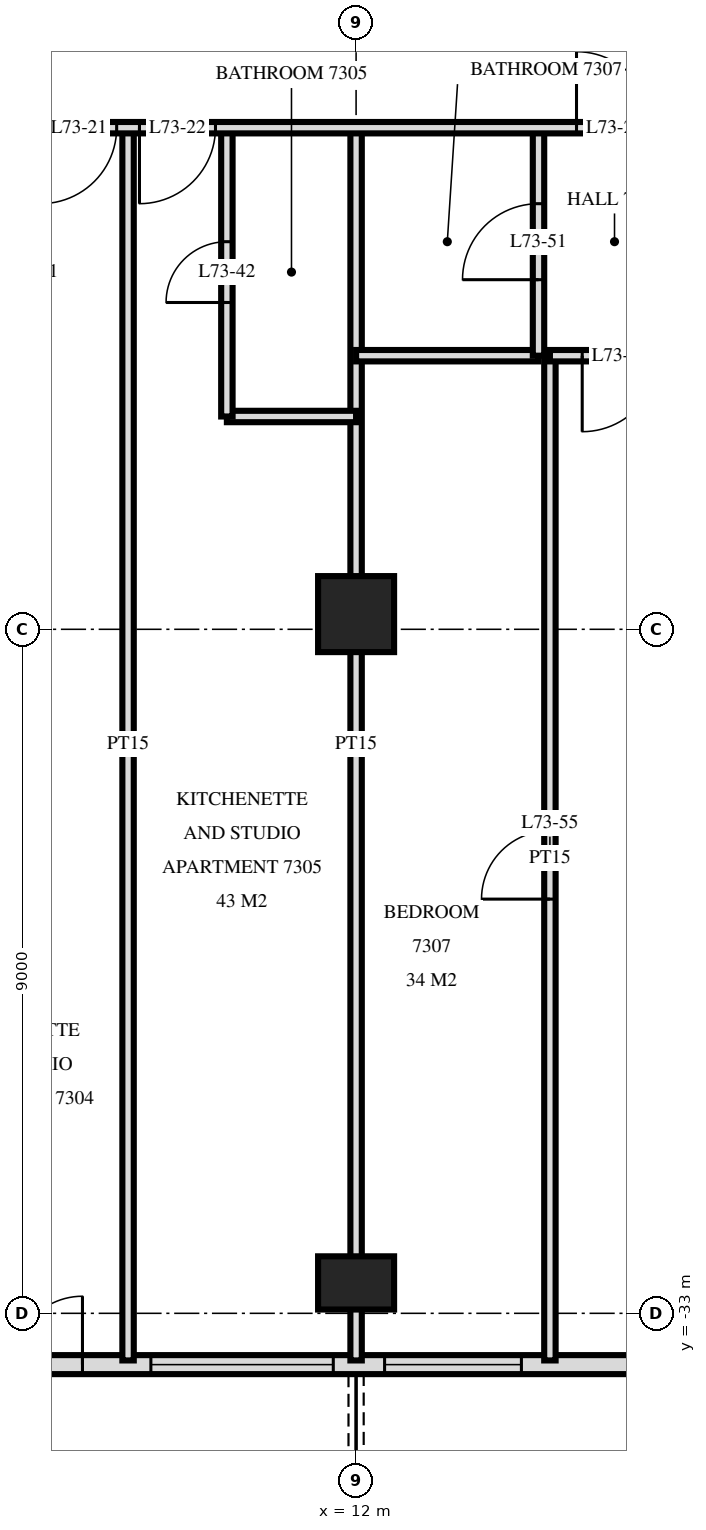
"""IFC4 building model, lengths in metres.
Left out: names, types, materials, properties, quantities, classifications, styles, units other than length and angle.
Written with IfcOpenShell. Run it as: python <this file> out.ifc"""

import sys

from ifc_helpers import new_model, si_unit, direction, frame, frame_2d, origin, origin_2d, place, context, subcontext, project, spatial, rectangle, extrude, element, fill, save


model = new_model("IFC4")
c1 = context("Model", 3, precision=1e-05, world=origin(), true_north=direction((0.0, 1.0)))
c2 = subcontext(c1, "Body", "Model", "MODEL_VIEW")
j1 = project(units=[si_unit("LENGTHUNIT", "METRE"), si_unit("PLANEANGLEUNIT", "RADIAN")], contexts=[c1])
p1 = place(None, origin())
s1 = spatial("IfcSite", under=j1, at=p1, CompositionType="ELEMENT")
p2 = place(p1, origin())
s2 = spatial("IfcBuilding", under=s1, at=p2, CompositionType="ELEMENT")
p3 = place(p2, frame((0.0, 0.0, 277.1)))
s3 = spatial("IfcBuildingStorey", under=s2, at=p3, CompositionType="ELEMENT", Elevation=277.1)
p4 = place(p3, frame((12.0, -32.6, 0.0), z_axis=(0.0, 0.0, 1.0), x_axis=(1.0, 0.0, 0.0)))
e1 = element("IfcColumn", 1, at=p4, inside=s3, PredefinedType="COLUMN", context=c2, shape_type="SweptSolid", body=[
    extrude(rectangle(XDim=1.0, YDim=0.7, at=origin_2d()), origin(), (0.0, 0.0, 1.0), 3.5),
])
p5 = place(p3, frame((12.0, -23.8, 0.0), z_axis=(0.0, 0.0, 1.0), x_axis=(1.0, 0.0, 0.0)))
e2 = element("IfcColumn", 2, at=p5, inside=s3, PredefinedType="COLUMN", context=c2, shape_type="SweptSolid", body=[
    extrude(rectangle(XDim=1.0, YDim=1.0, at=origin_2d()), origin(), (0.0, 0.0, 1.0), 3.5),
])
p6 = place(p3, frame((-18.575, -33.675, 0.0), z_axis=(0.0, 0.0, 1.0), x_axis=(1.0, 0.0, 0.0)))
e3 = element("IfcWall", 3, at=p6, inside=s3, PredefinedType="SOLIDWALL", context=c2, shape_type="SweptSolid", body=[
    extrude(rectangle(XDim=37.151, YDim=0.25, at=frame_2d((18.575, 0.0))), origin(), (0.0, 0.0, 1.0), 3.22),
])
p7 = place(p6, frame((4.175, 0.0, 0.0)))
e4 = element("IfcOpeningElement", 4, at=p7, cuts=e3, PredefinedType="OPENING", context=c2, shape_type="SweptSolid", body=[
    extrude(rectangle(XDim=1.8, YDim=2.4, at=frame_2d((0.9, 1.2))), frame((0.0, 0.135, 0.0), z_axis=(0.0, -1.0, 0.0), x_axis=(1.0, 0.0, 0.0)), (0.0, 0.0, 1.0), 0.27),
])
p8 = place(p6, frame((7.512, 0.0, 0.0)))
e5 = element("IfcOpeningElement", 5, at=p8, cuts=e3, PredefinedType="OPENING", context=c2, shape_type="SweptSolid", body=[
    extrude(rectangle(XDim=1.8, YDim=2.4, at=frame_2d((0.9, 1.2))), frame((0.0, 0.135, 0.0), z_axis=(0.0, -1.0, 0.0), x_axis=(1.0, 0.0, 0.0)), (0.0, 0.0, 1.0), 0.27),
])
p9 = place(p6, frame((10.287, 0.0, 0.9)))
e6 = element("IfcOpeningElement", 6, at=p9, cuts=e3, PredefinedType="OPENING", context=c2, shape_type="SweptSolid", body=[
    extrude(rectangle(XDim=1.8, YDim=1.5, at=frame_2d((0.9, 0.75))), frame((0.0, 0.135, 0.0), z_axis=(0.0, -1.0, 0.0), x_axis=(1.0, 0.0, 0.0)), (0.0, 0.0, 1.0), 0.27),
])
p10 = place(p6, frame((12.875, 0.0, 0.9)))
e7 = element("IfcOpeningElement", 7, at=p10, cuts=e3, PredefinedType="OPENING", context=c2, shape_type="SweptSolid", body=[
    extrude(rectangle(XDim=2.4, YDim=1.5, at=frame_2d((1.2, 0.75))), frame((0.0, 0.135, 0.0), z_axis=(0.0, -1.0, 0.0), x_axis=(1.0, 0.0, 0.0)), (0.0, 0.0, 1.0), 0.27),
])
p11 = place(p6, frame((16.175, 0.0, 0.0)))
e8 = element("IfcOpeningElement", 8, at=p11, cuts=e3, PredefinedType="OPENING", context=c2, shape_type="SweptSolid", body=[
    extrude(rectangle(XDim=1.8, YDim=2.4, at=frame_2d((0.9, 1.2))), frame((0.0, 0.135, 0.0), z_axis=(0.0, -1.0, 0.0), x_axis=(1.0, 0.0, 0.0)), (0.0, 0.0, 1.0), 0.27),
])
p12 = place(p6, frame((19.175, 0.0, 0.0)))
e9 = element("IfcOpeningElement", 9, at=p12, cuts=e3, PredefinedType="OPENING", context=c2, shape_type="SweptSolid", body=[
    extrude(rectangle(XDim=1.8, YDim=2.4, at=frame_2d((0.9, 1.2))), frame((0.0, 0.135, 0.0), z_axis=(0.0, -1.0, 0.0), x_axis=(1.0, 0.0, 0.0)), (0.0, 0.0, 1.0), 0.27),
])
p13 = place(p6, frame((21.875, 0.0, 0.9)))
e10 = element("IfcOpeningElement", 10, at=p13, cuts=e3, PredefinedType="OPENING", context=c2, shape_type="SweptSolid", body=[
    extrude(rectangle(XDim=2.4, YDim=1.5, at=frame_2d((1.2, 0.75))), frame((0.0, 0.135, 0.0), z_axis=(0.0, -1.0, 0.0), x_axis=(1.0, 0.0, 0.0)), (0.0, 0.0, 1.0), 0.27),
])
p14 = place(p6, frame((25.175, 0.0, 0.0)))
e11 = element("IfcOpeningElement", 11, at=p14, cuts=e3, PredefinedType="OPENING", context=c2, shape_type="SweptSolid", body=[
    extrude(rectangle(XDim=1.8, YDim=2.4, at=frame_2d((0.9, 1.2))), frame((0.0, 0.135, 0.0), z_axis=(0.0, -1.0, 0.0), x_axis=(1.0, 0.0, 0.0)), (0.0, 0.0, 1.0), 0.27),
])
p15 = place(p6, frame((27.875, 0.0, 0.9)))
e12 = element("IfcOpeningElement", 12, at=p15, cuts=e3, PredefinedType="OPENING", context=c2, shape_type="SweptSolid", body=[
    extrude(rectangle(XDim=2.4, YDim=1.5, at=frame_2d((1.2, 0.75))), frame((0.0, 0.135, 0.0), z_axis=(0.0, -1.0, 0.0), x_axis=(1.0, 0.0, 0.0)), (0.0, 0.0, 1.0), 0.27),
])
p16 = place(p6, frame((30.95, 0.0, 0.9)))
e13 = element("IfcOpeningElement", 13, at=p16, cuts=e3, PredefinedType="OPENING", context=c2, shape_type="SweptSolid", body=[
    extrude(rectangle(XDim=1.8, YDim=1.5, at=frame_2d((0.9, 0.75))), frame((0.0, 0.135, 0.0), z_axis=(0.0, -1.0, 0.0), x_axis=(1.0, 0.0, 0.0)), (0.0, 0.0, 1.0), 0.27),
])
p17 = place(p6, frame((34.175, 0.0, 0.0)))
e14 = element("IfcOpeningElement", 14, at=p17, cuts=e3, PredefinedType="OPENING", context=c2, shape_type="SweptSolid", body=[
    extrude(rectangle(XDim=1.8, YDim=2.4, at=frame_2d((0.9, 1.2))), frame((0.0, 0.135, 0.0), z_axis=(0.0, -1.0, 0.0), x_axis=(1.0, 0.0, 0.0)), (0.0, 0.0, 1.0), 0.27),
])
p18 = place(p3, frame((14.55, -33.62, 0.0), z_axis=(0.0, 0.0, 1.0), x_axis=(0.0, 1.0, 0.0)))
e15 = element("IfcWall", 15, at=p18, inside=s3, PredefinedType="PARTITIONING", context=c2, shape_type="SweptSolid", body=[
    extrude(rectangle(XDim=13.22, YDim=0.15, at=frame_2d((6.61, 0.0))), origin(), (0.0, 0.0, 1.0), 3.22),
])
p19 = place(p18, frame((6.07, 0.0, 0.0)))
e16 = element("IfcOpeningElement", 16, at=p19, cuts=e15, PredefinedType="OPENING", context=c2, shape_type="SweptSolid", body=[
    extrude(rectangle(XDim=0.9, YDim=2.1, at=frame_2d((0.45, 1.05))), frame((0.0, 0.085, 0.0), z_axis=(0.0, -1.0, 0.0), x_axis=(1.0, 0.0, 0.0)), (0.0, 0.0, 1.0), 0.17),
])
p20 = place(p3, frame((14.4, -20.4, 0.0), z_axis=(0.0, 0.0, 1.0), x_axis=(0.0, 1.0, 0.0)))
e17 = element("IfcWall", 17, at=p20, inside=s3, PredefinedType="PARTITIONING", context=c2, shape_type="SweptSolid", body=[
    extrude(rectangle(XDim=3.0, YDim=0.15, at=frame_2d((1.5, 0.0))), origin(), (0.0, 0.0, 1.0), 3.22),
])
p21 = place(p20, frame((1.0, 0.0, 0.0)))
e18 = element("IfcOpeningElement", 18, at=p21, cuts=e17, PredefinedType="OPENING", context=c2, shape_type="SweptSolid", body=[
    extrude(rectangle(XDim=1.0, YDim=2.1, at=frame_2d((0.5, 1.05))), frame((0.0, 0.085, 0.0), z_axis=(0.0, -1.0, 0.0), x_axis=(1.0, 0.0, 0.0)), (0.0, 0.0, 1.0), 0.17),
])
p22 = place(p3, frame((12.0, -33.62, 0.0), z_axis=(0.0, 0.0, 1.0), x_axis=(0.0, 1.0, 0.0)))
e19 = element("IfcWall", 19, at=p22, inside=s3, PredefinedType="PARTITIONING", context=c2, shape_type="SweptSolid", body=[
    extrude(rectangle(XDim=16.22, YDim=0.15, at=frame_2d((8.11, 0.0))), origin(), (0.0, 0.0, 1.0), 3.22),
])
p23 = place(p3, frame((10.3, -21.2, 0.0), z_axis=(0.0, 0.0, 1.0), x_axis=(0.0, 1.0, 0.0)))
e20 = element("IfcWall", 20, at=p23, inside=s3, PredefinedType="PARTITIONING", context=c2, shape_type="SweptSolid", body=[
    extrude(rectangle(XDim=3.8, YDim=0.15, at=frame_2d((1.9, 0.0))), origin(), (0.0, 0.0, 1.0), 3.22),
])
p24 = place(p23, frame((1.5, 0.0, 0.0)))
e21 = element("IfcOpeningElement", 21, at=p24, cuts=e20, PredefinedType="OPENING", context=c2, shape_type="SweptSolid", body=[
    extrude(rectangle(XDim=0.8, YDim=2.1, at=frame_2d((0.4, 1.05))), frame((0.0, 0.085, 0.0), z_axis=(0.0, -1.0, 0.0), x_axis=(1.0, 0.0, 0.0)), (0.0, 0.0, 1.0), 0.17),
])
p25 = place(p3, frame((9.0, -33.62, 0.0), z_axis=(0.0, 0.0, 1.0), x_axis=(0.0, 1.0, 0.0)))
e22 = element("IfcWall", 22, at=p25, inside=s3, PredefinedType="PARTITIONING", context=c2, shape_type="SweptSolid", body=[
    extrude(rectangle(XDim=16.22, YDim=0.15, at=frame_2d((8.11, 0.0))), origin(), (0.0, 0.0, 1.0), 3.22),
])
p26 = place(p3, frame((10.3, -21.2, 0.0), z_axis=(0.0, 0.0, 1.0), x_axis=(1.0, 0.0, 0.0)))
e23 = element("IfcWall", 23, at=p26, inside=s3, PredefinedType="PARTITIONING", context=c2, shape_type="SweptSolid", body=[
    extrude(rectangle(XDim=1.7, YDim=0.15, at=frame_2d((0.85, 0.0))), origin(), (0.0, 0.0, 1.0), 3.22),
])
p27 = place(p3, frame((14.55, -20.4, 0.0), z_axis=(0.0, 0.0, 1.0), x_axis=(1.0, 0.0, 0.0)))
e24 = element("IfcWall", 24, at=p27, inside=s3, PredefinedType="PARTITIONING", context=c2, shape_type="SweptSolid", body=[
    extrude(rectangle(XDim=1.85, YDim=0.15, at=frame_2d((0.925, 0.0))), origin(), (0.0, 0.0, 1.0), 3.22),
])
p28 = place(p27, frame((0.425, 0.0, 0.0)))
e25 = element("IfcOpeningElement", 25, at=p28, cuts=e24, PredefinedType="OPENING", context=c2, shape_type="SweptSolid", body=[
    extrude(rectangle(XDim=1.0, YDim=2.1, at=frame_2d((0.5, 1.05))), frame((0.0, 0.085, 0.0), z_axis=(0.0, -1.0, 0.0), x_axis=(1.0, 0.0, 0.0)), (0.0, 0.0, 1.0), 0.17),
])
p29 = place(p3, frame((12.0, -20.4, 0.0), z_axis=(0.0, 0.0, 1.0), x_axis=(1.0, 0.0, 0.0)))
e26 = element("IfcWall", 26, at=p29, inside=s3, PredefinedType="PARTITIONING", context=c2, shape_type="SweptSolid", body=[
    extrude(rectangle(XDim=2.4, YDim=0.15, at=frame_2d((1.2, 0.0))), origin(), (0.0, 0.0, 1.0), 3.22),
])
p30 = place(p3, frame((-22.92, -17.4, 0.0), z_axis=(0.0, 0.0, 1.0), x_axis=(1.0, 0.0, 0.0)))
e27 = element("IfcWall", 27, at=p30, inside=s3, PredefinedType="PARTITIONING", context=c2, shape_type="SweptSolid", body=[
    extrude(rectangle(XDim=45.84, YDim=0.15, at=frame_2d((22.92, 0.0))), origin(), (0.0, 0.0, 1.0), 3.22),
])
p31 = place(p30, frame((21.67, 0.0, 0.0)))
e28 = element("IfcOpeningElement", 28, at=p31, cuts=e27, PredefinedType="OPENING", context=c2, shape_type="SweptSolid", body=[
    extrude(rectangle(XDim=1.0, YDim=2.1, at=frame_2d((0.5, 1.05))), frame((0.0, 0.085, 0.0), z_axis=(0.0, -1.0, 0.0), x_axis=(1.0, 0.0, 0.0)), (0.0, 0.0, 1.0), 0.17),
])
p32 = place(p30, frame((24.77, 0.0, 0.0)))
e29 = element("IfcOpeningElement", 29, at=p32, cuts=e27, PredefinedType="OPENING", context=c2, shape_type="SweptSolid", body=[
    extrude(rectangle(XDim=1.0, YDim=2.1, at=frame_2d((0.5, 1.05))), frame((0.0, 0.085, 0.0), z_axis=(0.0, -1.0, 0.0), x_axis=(1.0, 0.0, 0.0)), (0.0, 0.0, 1.0), 0.17),
])
p33 = place(p30, frame((26.07, 0.0, 0.0)))
e30 = element("IfcOpeningElement", 30, at=p33, cuts=e27, PredefinedType="OPENING", context=c2, shape_type="SweptSolid", body=[
    extrude(rectangle(XDim=1.0, YDim=2.1, at=frame_2d((0.5, 1.05))), frame((0.0, 0.085, 0.0), z_axis=(0.0, -1.0, 0.0), x_axis=(1.0, 0.0, 0.0)), (0.0, 0.0, 1.0), 0.17),
])
p34 = place(p30, frame((30.77, 0.0, 0.0)))
e31 = element("IfcOpeningElement", 31, at=p34, cuts=e27, PredefinedType="OPENING", context=c2, shape_type="SweptSolid", body=[
    extrude(rectangle(XDim=1.0, YDim=2.1, at=frame_2d((0.5, 1.05))), frame((0.0, 0.085, 0.0), z_axis=(0.0, -1.0, 0.0), x_axis=(1.0, 0.0, 0.0)), (0.0, 0.0, 1.0), 0.17),
])
p35 = place(p30, frame((32.07, 0.0, 0.0)))
e32 = element("IfcOpeningElement", 32, at=p35, cuts=e27, PredefinedType="OPENING", context=c2, shape_type="SweptSolid", body=[
    extrude(rectangle(XDim=1.0, YDim=2.1, at=frame_2d((0.5, 1.05))), frame((0.0, 0.085, 0.0), z_axis=(0.0, -1.0, 0.0), x_axis=(1.0, 0.0, 0.0)), (0.0, 0.0, 1.0), 0.17),
])
p36 = place(p30, frame((9.42, 0.0, 0.0)))
e33 = element("IfcOpeningElement", 33, at=p36, cuts=e27, PredefinedType="OPENING", context=c2, shape_type="SweptSolid", body=[
    extrude(rectangle(XDim=1.0, YDim=2.1, at=frame_2d((0.5, 1.05))), frame((0.0, 0.085, 0.0), z_axis=(0.0, -1.0, 0.0), x_axis=(1.0, 0.0, 0.0)), (0.0, 0.0, 1.0), 0.17),
])
p37 = place(p30, frame((2.67, 0.0, 0.0)))
e34 = element("IfcOpeningElement", 34, at=p37, cuts=e27, PredefinedType="OPENING", context=c2, shape_type="SweptSolid", body=[
    extrude(rectangle(XDim=1.0, YDim=2.1, at=frame_2d((0.5, 1.05))), frame((0.0, 0.085, 0.0), z_axis=(0.0, -1.0, 0.0), x_axis=(1.0, 0.0, 0.0)), (0.0, 0.0, 1.0), 0.17),
])
p38 = place(p30, frame((37.82, 0.0, 0.0)))
e35 = element("IfcOpeningElement", 35, at=p38, cuts=e27, PredefinedType="OPENING", context=c2, shape_type="SweptSolid", body=[
    extrude(rectangle(XDim=1.0, YDim=2.1, at=frame_2d((0.5, 1.05))), frame((0.0, 0.085, 0.0), z_axis=(0.0, -1.0, 0.0), x_axis=(1.0, 0.0, 0.0)), (0.0, 0.0, 1.0), 0.17),
])
p39 = place(p14, origin())
e36 = element("IfcDoor", 36, at=p39, inside=s3, OperationType="DOUBLE_DOOR_SINGLE_SWING", PredefinedType="DOOR", context=c2, shape_type="SweptSolid", body=[
    extrude(rectangle(XDim=1.8, YDim=2.4, at=frame_2d((0.9, 1.2))), frame((0.0, 0.025, 0.0), z_axis=(0.0, -1.0, 0.0), x_axis=(1.0, 0.0, 0.0)), (0.0, 0.0, 1.0), 0.05),
])
fill(e11, e36)
p40 = place(p15, origin())
e37 = element("IfcWindow", 37, at=p40, inside=s3, PartitioningType="SINGLE_PANEL", PredefinedType="WINDOW", context=c2, shape_type="SweptSolid", body=[
    extrude(rectangle(XDim=2.4, YDim=1.5, at=frame_2d((1.2, 0.75))), frame((0.0, 0.03, 0.0), z_axis=(0.0, -1.0, 0.0), x_axis=(1.0, 0.0, 0.0)), (0.0, 0.0, 1.0), 0.06),
])
fill(e12, e37)
p41 = place(p16, origin())
e38 = element("IfcWindow", 38, at=p41, inside=s3, PartitioningType="SINGLE_PANEL", PredefinedType="WINDOW", context=c2, shape_type="SweptSolid", body=[
    extrude(rectangle(XDim=1.8, YDim=1.5, at=frame_2d((0.9, 0.75))), frame((0.0, 0.03, 0.0), z_axis=(0.0, -1.0, 0.0), x_axis=(1.0, 0.0, 0.0)), (0.0, 0.0, 1.0), 0.06),
])
fill(e13, e38)
p42 = place(p34, frame((0.5, 0.0, 0.0), z_axis=(0.0, 0.0, 1.0), x_axis=(-1.0, 0.0, 0.0)))
e39 = element("IfcDoor", 39, at=p42, inside=s3, OperationType="SINGLE_SWING_LEFT", PredefinedType="DOOR", context=c2, shape_type="SweptSolid", body=[
    extrude(rectangle(XDim=1.0, YDim=2.1, at=frame_2d((0.0, 1.05))), frame((0.0, -0.025, 0.0), z_axis=(0.0, 1.0, 0.0), x_axis=(-1.0, 0.0, 0.0)), (0.0, 0.0, 1.0), 0.05),
])
fill(e31, e39)
p43 = place(p35, frame((0.5, 0.0, 0.0), z_axis=(0.0, 0.0, 1.0), x_axis=(-1.0, 0.0, 0.0)))
e40 = element("IfcDoor", 40, at=p43, inside=s3, OperationType="SINGLE_SWING_LEFT", PredefinedType="DOOR", context=c2, shape_type="SweptSolid", body=[
    extrude(rectangle(XDim=1.0, YDim=2.1, at=frame_2d((0.0, 1.05))), frame((0.0, -0.025, 0.0), z_axis=(0.0, 1.0, 0.0), x_axis=(-1.0, 0.0, 0.0)), (0.0, 0.0, 1.0), 0.05),
])
fill(e32, e40)
p44 = place(p38, origin())
e41 = element("IfcDoor", 41, at=p44, inside=s3, OperationType="SINGLE_SWING_RIGHT", PredefinedType="DOOR", context=c2, shape_type="SweptSolid", body=[
    extrude(rectangle(XDim=1.0, YDim=2.1, at=frame_2d((0.5, 1.05))), frame((0.0, 0.025, 0.0), z_axis=(0.0, -1.0, 0.0), x_axis=(1.0, 0.0, 0.0)), (0.0, 0.0, 1.0), 0.05),
])
fill(e35, e41)
p45 = place(p24, origin())
e42 = element("IfcDoor", 42, at=p45, inside=s3, OperationType="SINGLE_SWING_RIGHT", PredefinedType="DOOR", context=c2, shape_type="SweptSolid", body=[
    extrude(rectangle(XDim=0.8, YDim=2.1, at=frame_2d((0.4, 1.05))), frame((0.0, 0.025, 0.0), z_axis=(0.0, -1.0, 0.0), x_axis=(1.0, 0.0, 0.0)), (0.0, 0.0, 1.0), 0.05),
])
fill(e21, e42)
p46 = place(p21, origin())
e43 = element("IfcDoor", 43, at=p46, inside=s3, OperationType="SINGLE_SWING_RIGHT", PredefinedType="DOOR", context=c2, shape_type="SweptSolid", body=[
    extrude(rectangle(XDim=1.0, YDim=2.1, at=frame_2d((0.5, 1.05))), frame((0.0, 0.025, 0.0), z_axis=(0.0, -1.0, 0.0), x_axis=(1.0, 0.0, 0.0)), (0.0, 0.0, 1.0), 0.05),
])
fill(e18, e43)
p47 = place(p28, frame((0.5, 0.0, 0.0), z_axis=(0.0, 0.0, 1.0), x_axis=(-1.0, 0.0, 0.0)))
e44 = element("IfcDoor", 44, at=p47, inside=s3, OperationType="SINGLE_SWING_LEFT", PredefinedType="DOOR", context=c2, shape_type="SweptSolid", body=[
    extrude(rectangle(XDim=1.0, YDim=2.1, at=frame_2d((0.0, 1.05))), frame((0.0, -0.025, 0.0), z_axis=(0.0, 1.0, 0.0), x_axis=(-1.0, 0.0, 0.0)), (0.0, 0.0, 1.0), 0.05),
])
fill(e25, e44)
p48 = place(p19, origin())
e45 = element("IfcDoor", 45, at=p48, inside=s3, OperationType="SINGLE_SWING_RIGHT", PredefinedType="DOOR", context=c2, shape_type="SweptSolid", body=[
    extrude(rectangle(XDim=0.9, YDim=2.1, at=frame_2d((0.45, 1.05))), frame((0.0, 0.025, 0.0), z_axis=(0.0, -1.0, 0.0), x_axis=(1.0, 0.0, 0.0)), (0.0, 0.0, 1.0), 0.05),
])
fill(e16, e45)
save(model, sys.argv[1])
